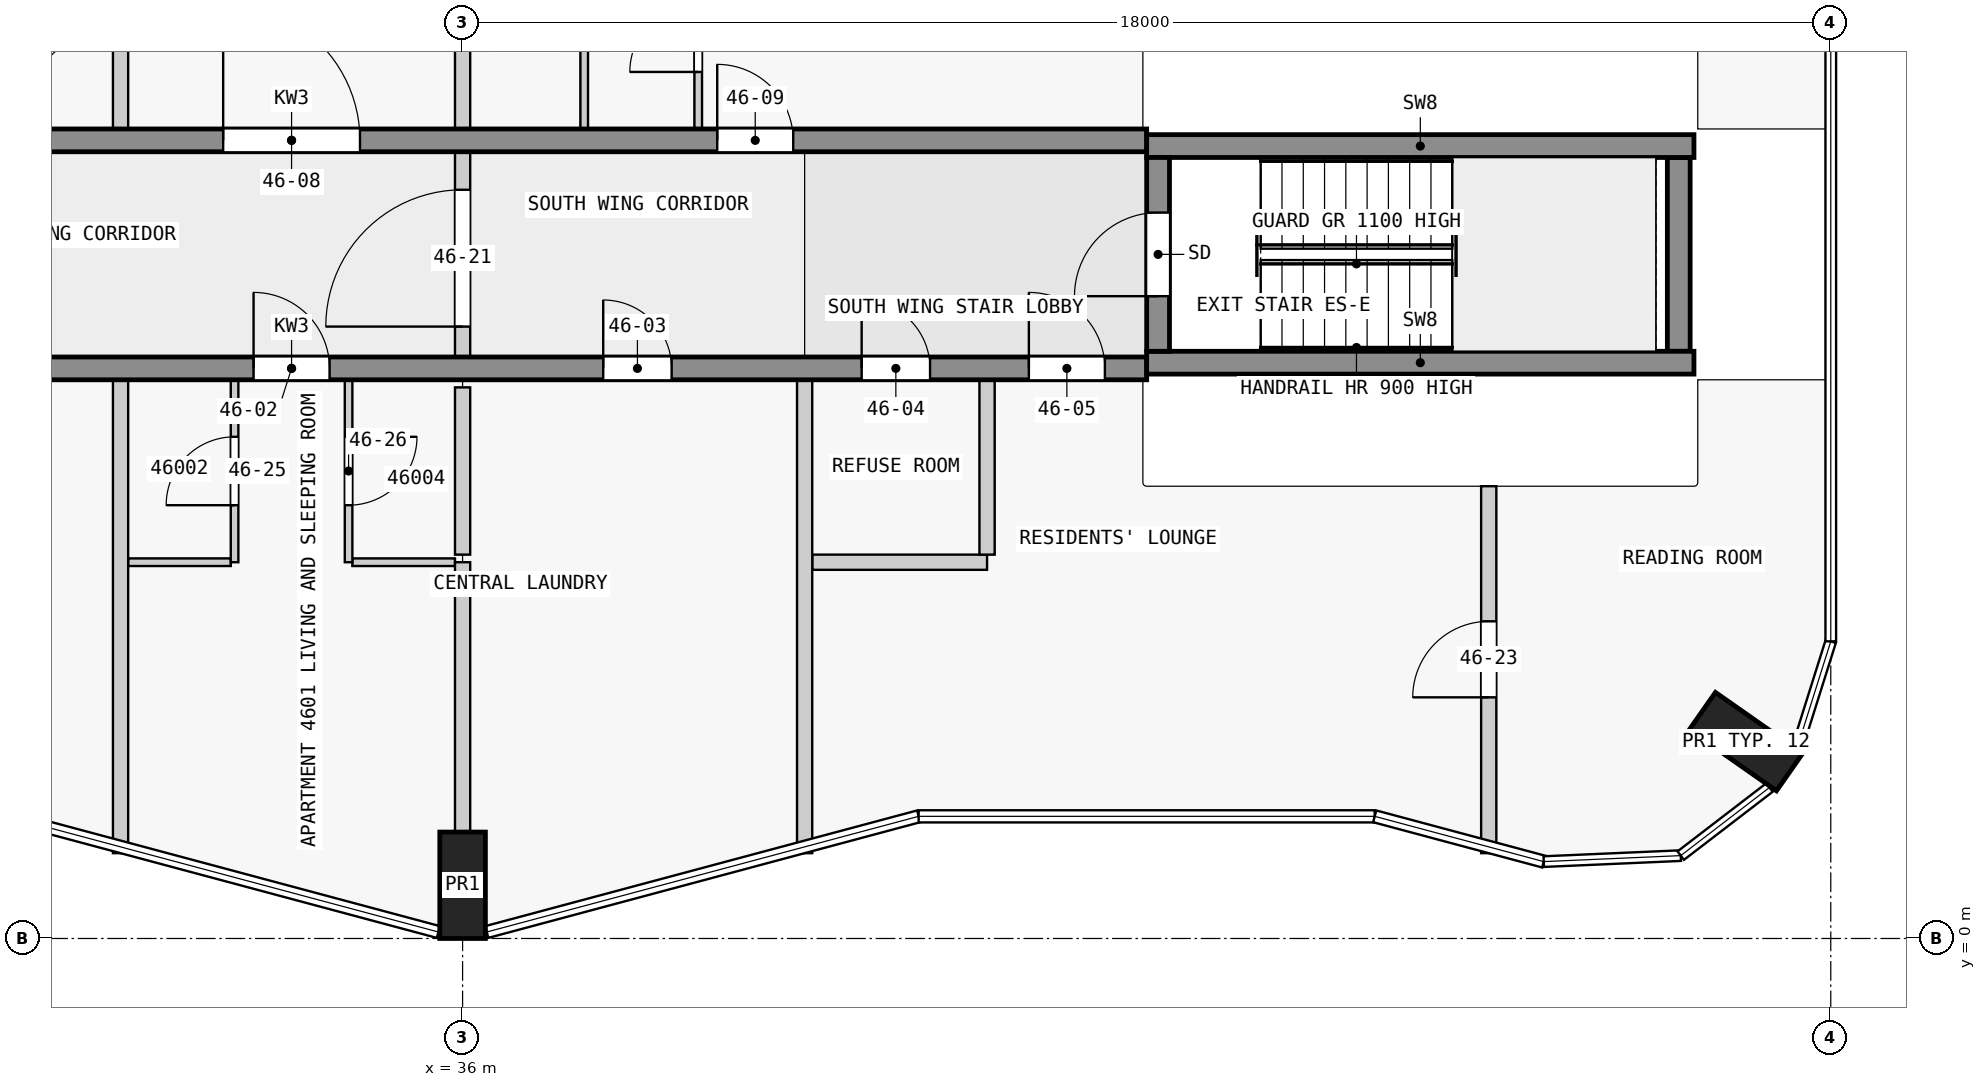
"""IFC4 building model, lengths in metres.
Left out: names, types, materials, properties, quantities, classifications, styles, units other than length and angle.
Written with IfcOpenShell. Run it as: python <this file> out.ifc"""

import sys

from ifc_helpers import new_model, si_unit, direction, frame, frame_2d, origin, origin_2d, place, context, subcontext, project, spatial, rectangle, extrude, element, fill, save


model = new_model("IFC4")
c1 = context("Model", 3, precision=1e-05, world=origin(), true_north=direction((0.0, 1.0)))
c2 = subcontext(c1, "Body", "Model", "MODEL_VIEW")
j1 = project(units=[si_unit("LENGTHUNIT", "METRE"), si_unit("PLANEANGLEUNIT", "RADIAN")], contexts=[c1])
p1 = place(None, origin())
s1 = spatial("IfcSite", under=j1, at=p1, CompositionType="ELEMENT")
p2 = place(p1, origin())
s2 = spatial("IfcBuilding", under=s1, at=p2, CompositionType="ELEMENT")
p3 = place(p2, frame((0.0, 0.0, 177.9)))
s3 = spatial("IfcBuildingStorey", under=s2, at=p3, CompositionType="ELEMENT", Elevation=177.9)
for number, where, z_axis, x_axis in (
    (1, (36.0, 0.7, 0.0), (0.0, 0.0, 1.0), (1.0, 0.0, 0.0)),
    (2, (52.884, 2.59, 0.0), (0.0, 0.0, 1.0), (0.574, 0.819, 0.0)),
):
    element("IfcColumn", number, at=place(p3, frame(where, z_axis=z_axis, x_axis=x_axis)), inside=s3, PredefinedType="COLUMN", context=c2, shape_type="SweptSolid", body=[
        extrude(rectangle(XDim=0.6, YDim=1.4, at=origin_2d()), origin(), (0.0, 0.0, 1.0), 3.5),
    ])
p4 = place(p3, frame((45.15, 7.725, 0.0), z_axis=(0.0, 0.0, 1.0), x_axis=(0.0, 1.0, 0.0)))
e3 = element("IfcWall", 3, at=p4, inside=s3, PredefinedType="SHEAR", context=c2, shape_type="SweptSolid", body=[
    extrude(rectangle(XDim=2.55, YDim=0.3, at=frame_2d((1.275, 0.0))), origin(), (0.0, 0.0, 1.0), 3.5),
])
p5 = place(p4, frame((0.725, 0.0, 0.0)))
e4 = element("IfcOpeningElement", 4, at=p5, cuts=e3, PredefinedType="OPENING", context=c2, shape_type="SweptSolid", body=[
    extrude(rectangle(XDim=1.1, YDim=2.1, at=frame_2d((0.55, 1.05))), frame((0.0, 0.16, 0.0), z_axis=(0.0, -1.0, 0.0), x_axis=(1.0, 0.0, 0.0)), (0.0, 0.0, 1.0), 0.32),
])
p6 = place(p3, frame((52.0, 7.725, 0.0), z_axis=(0.0, 0.0, 1.0), x_axis=(0.0, 1.0, 0.0)))
e5 = element("IfcWall", 5, at=p6, inside=s3, PredefinedType="SHEAR", context=c2, shape_type="SweptSolid", body=[
    extrude(rectangle(XDim=2.55, YDim=0.3, at=frame_2d((1.275, 0.0))), origin(), (0.0, 0.0, 1.0), 3.5),
])
for number, where, z_axis, x_axis in (
    (6, (45.0, 7.575, 0.0), (0.0, 0.0, 1.0), (1.0, 0.0, 0.0)),
    (7, (45.0, 10.425, 0.0), (0.0, 0.0, 1.0), (1.0, 0.0, 0.0)),
):
    element("IfcWall", number, at=place(p3, frame(where, z_axis=z_axis, x_axis=x_axis)), inside=s3, PredefinedType="SHEAR", context=c2, shape_type="SweptSolid", body=[
        extrude(rectangle(XDim=7.2, YDim=0.3, at=frame_2d((3.6, 0.0))), origin(), (0.0, 0.0, 1.0), 3.5),
    ])
p7 = place(p3, frame((22.5, 7.5, 0.0), z_axis=(0.0, 0.0, 1.0), x_axis=(1.0, 0.0, 0.0)))
e8 = element("IfcWall", 8, at=p7, inside=s3, PredefinedType="SHEAR", context=c2, shape_type="SweptSolid", body=[
    extrude(rectangle(XDim=22.5, YDim=0.3, at=frame_2d((11.25, 0.0))), origin(), (0.0, 0.0, 1.0), 3.25),
])
p8 = place(p7, frame((4.05, 0.0, 0.0)))
e9 = element("IfcOpeningElement", 9, at=p8, cuts=e8, PredefinedType="OPENING", context=c2, shape_type="SweptSolid", body=[
    extrude(rectangle(XDim=1.0, YDim=2.1, at=frame_2d((0.5, 1.05))), frame((0.0, 0.16, 0.0), z_axis=(0.0, -1.0, 0.0), x_axis=(1.0, 0.0, 0.0)), (0.0, 0.0, 1.0), 0.32),
])
p9 = place(p7, frame((10.75, 0.0, 0.0)))
e10 = element("IfcOpeningElement", 10, at=p9, cuts=e8, PredefinedType="OPENING", context=c2, shape_type="SweptSolid", body=[
    extrude(rectangle(XDim=1.0, YDim=2.1, at=frame_2d((0.5, 1.05))), frame((0.0, 0.16, 0.0), z_axis=(0.0, -1.0, 0.0), x_axis=(1.0, 0.0, 0.0)), (0.0, 0.0, 1.0), 0.32),
])
p10 = place(p7, frame((15.35, 0.0, 0.0)))
e11 = element("IfcOpeningElement", 11, at=p10, cuts=e8, PredefinedType="OPENING", context=c2, shape_type="SweptSolid", body=[
    extrude(rectangle(XDim=0.9, YDim=2.1, at=frame_2d((0.45, 1.05))), frame((0.0, 0.16, 0.0), z_axis=(0.0, -1.0, 0.0), x_axis=(1.0, 0.0, 0.0)), (0.0, 0.0, 1.0), 0.32),
])
p11 = place(p7, frame((18.75, 0.0, 0.0)))
e12 = element("IfcOpeningElement", 12, at=p11, cuts=e8, PredefinedType="OPENING", context=c2, shape_type="SweptSolid", body=[
    extrude(rectangle(XDim=0.9, YDim=2.1, at=frame_2d((0.45, 1.05))), frame((0.0, 0.16, 0.0), z_axis=(0.0, -1.0, 0.0), x_axis=(1.0, 0.0, 0.0)), (0.0, 0.0, 1.0), 0.32),
])
p12 = place(p7, frame((20.95, 0.0, 0.0)))
e13 = element("IfcOpeningElement", 13, at=p12, cuts=e8, PredefinedType="OPENING", context=c2, shape_type="SweptSolid", body=[
    extrude(rectangle(XDim=1.0, YDim=2.1, at=frame_2d((0.5, 1.05))), frame((0.0, 0.16, 0.0), z_axis=(0.0, -1.0, 0.0), x_axis=(1.0, 0.0, 0.0)), (0.0, 0.0, 1.0), 0.32),
])
p13 = place(p3, frame((22.5, 10.5, 0.0), z_axis=(0.0, 0.0, 1.0), x_axis=(1.0, 0.0, 0.0)))
e14 = element("IfcWall", 14, at=p13, inside=s3, PredefinedType="SHEAR", context=c2, shape_type="SweptSolid", body=[
    extrude(rectangle(XDim=22.5, YDim=0.3, at=frame_2d((11.25, 0.0))), origin(), (0.0, 0.0, 1.0), 3.25),
])
p14 = place(p13, frame((1.85, 0.0, 0.0)))
e15 = element("IfcOpeningElement", 15, at=p14, cuts=e14, PredefinedType="OPENING", context=c2, shape_type="SweptSolid", body=[
    extrude(rectangle(XDim=0.9, YDim=2.1, at=frame_2d((0.45, 1.05))), frame((0.0, 0.16, 0.0), z_axis=(0.0, -1.0, 0.0), x_axis=(1.0, 0.0, 0.0)), (0.0, 0.0, 1.0), 0.32),
])
p15 = place(p13, frame((6.25, 0.0, 0.0)))
e16 = element("IfcOpeningElement", 16, at=p15, cuts=e14, PredefinedType="OPENING", context=c2, shape_type="SweptSolid", body=[
    extrude(rectangle(XDim=1.0, YDim=2.1, at=frame_2d((0.5, 1.05))), frame((0.0, 0.16, 0.0), z_axis=(0.0, -1.0, 0.0), x_axis=(1.0, 0.0, 0.0)), (0.0, 0.0, 1.0), 0.32),
])
p16 = place(p13, frame((10.35, 0.0, 0.0)))
e17 = element("IfcOpeningElement", 17, at=p16, cuts=e14, PredefinedType="OPENING", context=c2, shape_type="SweptSolid", body=[
    extrude(rectangle(XDim=1.8, YDim=2.1, at=frame_2d((0.9, 1.05))), frame((0.0, 0.16, 0.0), z_axis=(0.0, -1.0, 0.0), x_axis=(1.0, 0.0, 0.0)), (0.0, 0.0, 1.0), 0.32),
])
p17 = place(p13, frame((16.85, 0.0, 0.0)))
e18 = element("IfcOpeningElement", 18, at=p17, cuts=e14, PredefinedType="OPENING", context=c2, shape_type="SweptSolid", body=[
    extrude(rectangle(XDim=1.0, YDim=2.1, at=frame_2d((0.5, 1.05))), frame((0.0, 0.16, 0.0), z_axis=(0.0, -1.0, 0.0), x_axis=(1.0, 0.0, 0.0)), (0.0, 0.0, 1.0), 0.32),
])
for number, where, z_axis, x_axis in (
    (19, (31.6, 4.95, 0.0), (0.0, 0.0, 1.0), (1.0, 0.0, 0.0)),
    (20, (34.55, 4.95, 0.0), (0.0, 0.0, 1.0), (1.0, 0.0, 0.0)),
):
    element("IfcWall", number, at=place(p3, frame(where, z_axis=z_axis, x_axis=x_axis)), inside=s3, PredefinedType="PARTITIONING", context=c2, shape_type="SweptSolid", body=[
        extrude(rectangle(XDim=1.35, YDim=0.1, at=frame_2d((0.675, 0.0))), origin(), (0.0, 0.0, 1.0), 3.25),
    ])
p18 = place(p3, frame((40.6, 4.95, 0.0), z_axis=(0.0, 0.0, 1.0), x_axis=(1.0, 0.0, 0.0)))
e21 = element("IfcWall", 21, at=p18, inside=s3, PredefinedType="PARTITIONING", context=c2, shape_type="SweptSolid", body=[
    extrude(rectangle(XDim=2.3, YDim=0.2, at=frame_2d((1.15, 0.0))), origin(), (0.0, 0.0, 1.0), 3.25),
])
p19 = place(p3, frame((31.5, 1.122, 0.0), z_axis=(0.0, 0.0, 1.0), x_axis=(0.0, 1.0, 0.0)))
e22 = element("IfcWall", 22, at=p19, inside=s3, PredefinedType="PARTITIONING", context=c2, shape_type="SweptSolid", body=[
    extrude(rectangle(XDim=6.228, YDim=0.2, at=frame_2d((3.114, 0.0))), origin(), (0.0, 0.0, 1.0), 3.25),
])
p20 = place(p3, frame((31.5, 10.65, 0.0), z_axis=(0.0, 0.0, 1.0), x_axis=(0.0, 1.0, 0.0)))
e23 = element("IfcWall", 23, at=p20, inside=s3, PredefinedType="PARTITIONING", context=c2, shape_type="SweptSolid", body=[
    extrude(rectangle(XDim=2.3, YDim=0.2, at=frame_2d((1.15, 0.0))), origin(), (0.0, 0.0, 1.0), 3.25),
])
p21 = place(p3, frame((33.0, 4.95, 0.0), z_axis=(0.0, 0.0, 1.0), x_axis=(0.0, 1.0, 0.0)))
e24 = element("IfcWall", 24, at=p21, inside=s3, PredefinedType="PARTITIONING", context=c2, shape_type="SweptSolid", body=[
    extrude(rectangle(XDim=2.4, YDim=0.1, at=frame_2d((1.2, 0.0))), origin(), (0.0, 0.0, 1.0), 3.25),
])
p22 = place(p21, frame((0.75, 0.0, 0.0)))
e25 = element("IfcOpeningElement", 25, at=p22, cuts=e24, PredefinedType="OPENING", context=c2, shape_type="SweptSolid", body=[
    extrude(rectangle(XDim=0.9, YDim=2.1, at=frame_2d((0.45, 1.05))), frame((0.0, 0.06, 0.0), z_axis=(0.0, -1.0, 0.0), x_axis=(1.0, 0.0, 0.0)), (0.0, 0.0, 1.0), 0.12),
])
p23 = place(p3, frame((34.5, 7.35, 0.0), z_axis=(0.0, 0.0, 1.0), x_axis=(0.0, -1.0, 0.0)))
e26 = element("IfcWall", 26, at=p23, inside=s3, PredefinedType="PARTITIONING", context=c2, shape_type="SweptSolid", body=[
    extrude(rectangle(XDim=2.4, YDim=0.1, at=frame_2d((1.2, 0.0))), origin(), (0.0, 0.0, 1.0), 3.25),
])
p24 = place(p23, frame((0.75, 0.0, 0.0)))
e27 = element("IfcOpeningElement", 27, at=p24, cuts=e26, PredefinedType="OPENING", context=c2, shape_type="SweptSolid", body=[
    extrude(rectangle(XDim=0.9, YDim=2.1, at=frame_2d((0.45, 1.05))), frame((0.0, 0.06, 0.0), z_axis=(0.0, -1.0, 0.0), x_axis=(1.0, 0.0, 0.0)), (0.0, 0.0, 1.0), 0.12),
])
p25 = place(p3, frame((36.0, 4.95, 0.0), z_axis=(0.0, 0.0, 1.0), x_axis=(0.0, -1.0, 0.0)))
e28 = element("IfcWall", 28, at=p25, inside=s3, PredefinedType="PARTITIONING", context=c2, shape_type="SweptSolid", body=[
    extrude(rectangle(XDim=3.55, YDim=0.2, at=frame_2d((1.775, 0.0))), origin(), (0.0, 0.0, 1.0), 3.25),
])
p26 = place(p3, frame((36.0, 5.05, 0.0), z_axis=(0.0, 0.0, 1.0), x_axis=(0.0, 1.0, 0.0)))
e29 = element("IfcWall", 29, at=p26, inside=s3, PredefinedType="PARTITIONING", context=c2, shape_type="SweptSolid", body=[
    extrude(rectangle(XDim=2.2, YDim=0.2, at=frame_2d((1.1, 0.0))), origin(), (0.0, 0.0, 1.0), 3.25),
])
p27 = place(p3, frame((36.0, 10.65, 0.0), z_axis=(0.0, 0.0, 1.0), x_axis=(0.0, 1.0, 0.0)))
e30 = element("IfcWall", 30, at=p27, inside=s3, PredefinedType="PARTITIONING", context=c2, shape_type="SweptSolid", body=[
    extrude(rectangle(XDim=5.95, YDim=0.2, at=frame_2d((2.975, 0.0))), origin(), (0.0, 0.0, 1.0), 3.25),
])
p28 = place(p3, frame((37.6, 10.65, 0.0), z_axis=(0.0, 0.0, 1.0), x_axis=(0.0, 1.0, 0.0)))
e31 = element("IfcWall", 31, at=p28, inside=s3, PredefinedType="PARTITIONING", context=c2, shape_type="SweptSolid", body=[
    extrude(rectangle(XDim=2.35, YDim=0.1, at=frame_2d((1.175, 0.0))), origin(), (0.0, 0.0, 1.0), 3.25),
])
p29 = place(p3, frame((39.1, 10.65, 0.0), z_axis=(0.0, 0.0, 1.0), x_axis=(0.0, 1.0, 0.0)))
e32 = element("IfcWall", 32, at=p29, inside=s3, PredefinedType="PARTITIONING", context=c2, shape_type="SweptSolid", body=[
    extrude(rectangle(XDim=2.35, YDim=0.1, at=frame_2d((1.175, 0.0))), origin(), (0.0, 0.0, 1.0), 3.25),
])
p30 = place(p29, frame((0.75, 0.0, 0.0)))
e33 = element("IfcOpeningElement", 33, at=p30, cuts=e32, PredefinedType="OPENING", context=c2, shape_type="SweptSolid", body=[
    extrude(rectangle(XDim=0.9, YDim=2.1, at=frame_2d((0.45, 1.05))), frame((0.0, 0.06, 0.0), z_axis=(0.0, -1.0, 0.0), x_axis=(1.0, 0.0, 0.0)), (0.0, 0.0, 1.0), 0.12),
])
p31 = place(p3, frame((40.5, 1.122, 0.0), z_axis=(0.0, 0.0, 1.0), x_axis=(0.0, 1.0, 0.0)))
e34 = element("IfcWall", 34, at=p31, inside=s3, PredefinedType="PARTITIONING", context=c2, shape_type="SweptSolid", body=[
    extrude(rectangle(XDim=6.228, YDim=0.2, at=frame_2d((3.114, 0.0))), origin(), (0.0, 0.0, 1.0), 3.25),
])
p32 = place(p3, frame((42.9, 5.05, 0.0), z_axis=(0.0, 0.0, 1.0), x_axis=(0.0, 1.0, 0.0)))
e35 = element("IfcWall", 35, at=p32, inside=s3, PredefinedType="PARTITIONING", context=c2, shape_type="SweptSolid", body=[
    extrude(rectangle(XDim=2.3, YDim=0.2, at=frame_2d((1.15, 0.0))), origin(), (0.0, 0.0, 1.0), 3.25),
])
p33 = place(p3, frame((49.5, 1.122, 0.0), z_axis=(0.0, 0.0, 1.0), x_axis=(0.0, 1.0, 0.0)))
e36 = element("IfcWall", 36, at=p33, inside=s3, PredefinedType="PARTITIONING", context=c2, shape_type="SweptSolid", body=[
    extrude(rectangle(XDim=4.828, YDim=0.2, at=frame_2d((2.414, 0.0))), origin(), (0.0, 0.0, 1.0), 3.25),
])
p34 = place(p33, frame((2.05, 0.0, 0.0)))
e37 = element("IfcOpeningElement", 37, at=p34, cuts=e36, PredefinedType="OPENING", context=c2, shape_type="SweptSolid", body=[
    extrude(rectangle(XDim=1.0, YDim=2.1, at=frame_2d((0.5, 1.05))), frame((0.0, 0.11, 0.0), z_axis=(0.0, -1.0, 0.0), x_axis=(1.0, 0.0, 0.0)), (0.0, 0.0, 1.0), 0.22),
])
p35 = place(p3, frame((36.0, 7.35, 0.0), z_axis=(0.0, 0.0, 1.0), x_axis=(0.0, 1.0, 0.0)))
e38 = element("IfcWall", 38, at=p35, inside=s3, PredefinedType="PARTITIONING", context=c2, shape_type="SweptSolid", body=[
    extrude(rectangle(XDim=3.2, YDim=0.2, at=frame_2d((1.6, 0.0))), origin(), (0.0, 0.0, 1.0), 3.25),
])
p36 = place(p35, frame((0.7, 0.0, 0.0)))
e39 = element("IfcOpeningElement", 39, at=p36, cuts=e38, PredefinedType="OPENING", context=c2, shape_type="SweptSolid", body=[
    extrude(rectangle(XDim=1.8, YDim=2.1, at=frame_2d((0.9, 1.05))), frame((0.0, 0.11, 0.0), z_axis=(0.0, -1.0, 0.0), x_axis=(1.0, 0.0, 0.0)), (0.0, 0.0, 1.0), 0.22),
])
p37 = place(p5, origin())
e40 = element("IfcDoor", 40, at=p37, inside=s3, OperationType="SINGLE_SWING_LEFT", PredefinedType="DOOR", context=c2, shape_type="SweptSolid", body=[
    extrude(rectangle(XDim=1.1, YDim=2.1, at=frame_2d((0.55, 1.05))), frame((0.0, 0.025, 0.0), z_axis=(0.0, -1.0, 0.0), x_axis=(1.0, 0.0, 0.0)), (0.0, 0.0, 1.0), 0.05),
])
fill(e4, e40)
p38 = place(p9, origin())
e41 = element("IfcDoor", 41, at=p38, inside=s3, OperationType="SINGLE_SWING_LEFT", PredefinedType="DOOR", context=c2, shape_type="SweptSolid", body=[
    extrude(rectangle(XDim=1.0, YDim=2.1, at=frame_2d((0.5, 1.05))), frame((0.0, 0.025, 0.0), z_axis=(0.0, -1.0, 0.0), x_axis=(1.0, 0.0, 0.0)), (0.0, 0.0, 1.0), 0.05),
])
fill(e10, e41)
p39 = place(p10, origin())
e42 = element("IfcDoor", 42, at=p39, inside=s3, OperationType="SINGLE_SWING_RIGHT", PredefinedType="DOOR", context=c2, shape_type="SweptSolid", body=[
    extrude(rectangle(XDim=0.9, YDim=2.1, at=frame_2d((0.45, 1.05))), frame((0.0, 0.025, 0.0), z_axis=(0.0, -1.0, 0.0), x_axis=(1.0, 0.0, 0.0)), (0.0, 0.0, 1.0), 0.05),
])
fill(e11, e42)
p40 = place(p11, origin())
e43 = element("IfcDoor", 43, at=p40, inside=s3, OperationType="SINGLE_SWING_RIGHT", PredefinedType="DOOR", context=c2, shape_type="SweptSolid", body=[
    extrude(rectangle(XDim=0.9, YDim=2.1, at=frame_2d((0.45, 1.05))), frame((0.0, 0.025, 0.0), z_axis=(0.0, -1.0, 0.0), x_axis=(1.0, 0.0, 0.0)), (0.0, 0.0, 1.0), 0.05),
])
fill(e12, e43)
p41 = place(p12, origin())
e44 = element("IfcDoor", 44, at=p41, inside=s3, OperationType="SINGLE_SWING_RIGHT", PredefinedType="DOOR", context=c2, shape_type="SweptSolid", body=[
    extrude(rectangle(XDim=1.0, YDim=2.1, at=frame_2d((0.5, 1.05))), frame((0.0, 0.025, 0.0), z_axis=(0.0, -1.0, 0.0), x_axis=(1.0, 0.0, 0.0)), (0.0, 0.0, 1.0), 0.05),
])
fill(e13, e44)
p42 = place(p16, origin())
e45 = element("IfcDoor", 45, at=p42, inside=s3, OperationType="SINGLE_SWING_LEFT", PredefinedType="DOOR", context=c2, shape_type="SweptSolid", body=[
    extrude(rectangle(XDim=1.8, YDim=2.1, at=frame_2d((0.9, 1.05))), frame((0.0, 0.025, 0.0), z_axis=(0.0, -1.0, 0.0), x_axis=(1.0, 0.0, 0.0)), (0.0, 0.0, 1.0), 0.05),
])
fill(e17, e45)
p43 = place(p17, origin())
e46 = element("IfcDoor", 46, at=p43, inside=s3, OperationType="SINGLE_SWING_RIGHT", PredefinedType="DOOR", context=c2, shape_type="SweptSolid", body=[
    extrude(rectangle(XDim=1.0, YDim=2.1, at=frame_2d((0.5, 1.05))), frame((0.0, 0.025, 0.0), z_axis=(0.0, -1.0, 0.0), x_axis=(1.0, 0.0, 0.0)), (0.0, 0.0, 1.0), 0.05),
])
fill(e18, e46)
p44 = place(p36, origin())
e47 = element("IfcDoor", 47, at=p44, inside=s3, OperationType="SINGLE_SWING_LEFT", PredefinedType="DOOR", context=c2, shape_type="SweptSolid", body=[
    extrude(rectangle(XDim=1.8, YDim=2.1, at=frame_2d((0.9, 1.05))), frame((0.0, 0.025, 0.0), z_axis=(0.0, -1.0, 0.0), x_axis=(1.0, 0.0, 0.0)), (0.0, 0.0, 1.0), 0.05),
])
fill(e39, e47)
p45 = place(p34, origin())
e48 = element("IfcDoor", 48, at=p45, inside=s3, OperationType="SINGLE_SWING_RIGHT", PredefinedType="DOOR", context=c2, shape_type="SweptSolid", body=[
    extrude(rectangle(XDim=1.0, YDim=2.1, at=frame_2d((0.5, 1.05))), frame((0.0, 0.025, 0.0), z_axis=(0.0, -1.0, 0.0), x_axis=(1.0, 0.0, 0.0)), (0.0, 0.0, 1.0), 0.05),
])
fill(e37, e48)
p46 = place(p22, origin())
e49 = element("IfcDoor", 49, at=p46, inside=s3, OperationType="SINGLE_SWING_RIGHT", PredefinedType="DOOR", context=c2, shape_type="SweptSolid", body=[
    extrude(rectangle(XDim=0.9, YDim=2.1, at=frame_2d((0.45, 1.05))), frame((0.0, 0.025, 0.0), z_axis=(0.0, -1.0, 0.0), x_axis=(1.0, 0.0, 0.0)), (0.0, 0.0, 1.0), 0.05),
])
fill(e25, e49)
p47 = place(p24, origin())
e50 = element("IfcDoor", 50, at=p47, inside=s3, OperationType="SINGLE_SWING_RIGHT", PredefinedType="DOOR", context=c2, shape_type="SweptSolid", body=[
    extrude(rectangle(XDim=0.9, YDim=2.1, at=frame_2d((0.45, 1.05))), frame((0.0, 0.025, 0.0), z_axis=(0.0, -1.0, 0.0), x_axis=(1.0, 0.0, 0.0)), (0.0, 0.0, 1.0), 0.05),
])
fill(e27, e50)
p48 = place(p30, origin())
e51 = element("IfcDoor", 51, at=p48, inside=s3, OperationType="SINGLE_SWING_RIGHT", PredefinedType="DOOR", context=c2, shape_type="SweptSolid", body=[
    extrude(rectangle(XDim=0.9, YDim=2.1, at=frame_2d((0.45, 1.05))), frame((0.0, 0.025, 0.0), z_axis=(0.0, -1.0, 0.0), x_axis=(1.0, 0.0, 0.0)), (0.0, 0.0, 1.0), 0.05),
])
fill(e33, e51)
save(model, sys.argv[1])
